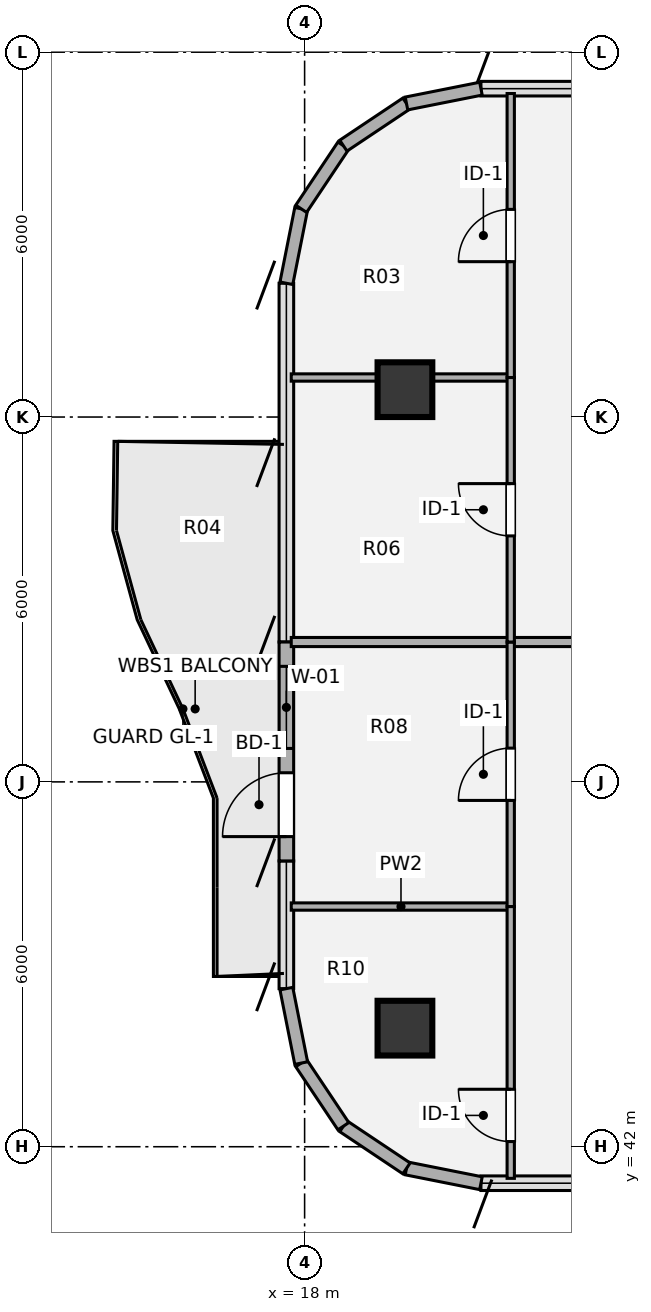
"""IFC4 building model, lengths in metres.
Left out: names, types, materials, properties, quantities, classifications, styles, units other than length and angle.
Written with IfcOpenShell. Run it as: python <this file> out.ifc"""

import sys

from ifc_helpers import new_model, si_unit, direction, frame, frame_2d, origin, origin_2d, place, context, subcontext, project, spatial, rectangle, hollow_circle, extrude, source, transform, mapped, element, fill, save


model = new_model("IFC4")
c1 = context("Model", 3, precision=1e-05, world=origin(), true_north=direction((0.0, 1.0)))
c2 = subcontext(c1, "Body", "Model", "MODEL_VIEW")
j1 = project(units=[si_unit("LENGTHUNIT", "METRE"), si_unit("PLANEANGLEUNIT", "RADIAN")], contexts=[c1])
p1 = place(None, origin())
s1 = spatial("IfcSite", under=j1, at=p1, CompositionType="ELEMENT")
p2 = place(p1, origin())
s2 = spatial("IfcBuilding", under=s1, at=p2, CompositionType="ELEMENT")
p3 = place(p2, frame((0.0, 0.0, 279.72)))
s3 = spatial("IfcBuildingStorey", under=s2, at=p3, CompositionType="ELEMENT", Elevation=279.72)
m1 = source(origin(), c2, "Body", "SweptSolid", [
    extrude(hollow_circle(Radius=0.45, WallThickness=0.032, at=origin_2d()), origin(), (0.0, 0.0, 1.0), 3.78),
])
for number, where, z_axis, x_axis in (
    (1, (19.65, 43.95, 0.0), (0.0, 0.0, 1.0), (1.0, 0.0, 0.0)),
    (2, (19.65, 54.45, 0.0), (0.0, 0.0, 1.0), (1.0, 0.0, 0.0)),
):
    element("IfcColumn", number, at=place(p3, frame(where, z_axis=z_axis, x_axis=x_axis)), inside=s3, PredefinedType="COLUMN", context=c2, shape_type="MappedRepresentation", body=[
        mapped(m1, transform((0.0, 0.0, 0.0), x_axis=(1.0, 0.0, 0.0), y_axis=(0.0, 1.0, 0.0), z_axis=(0.0, 0.0, 1.0), scale=1.0)),
    ])
for number, where, z_axis, x_axis in (
    (3, (20.9, 41.4, 0.0), (0.0, 0.0, 1.0), (-0.981, 0.195, 0.0)),
    (4, (19.675, 41.644, 0.0), (0.0, 0.0, 1.0), (-0.831, 0.556, 0.0)),
    (5, (18.637, 42.337, 0.0), (0.0, 0.0, 1.0), (-0.556, 0.831, 0.0)),
    (6, (17.944, 43.375, 0.0), (0.0, 0.0, 1.0), (-0.195, 0.981, 0.0)),
):
    element("IfcWall", number, at=place(p3, frame(where, z_axis=z_axis, x_axis=x_axis)), inside=s3, PredefinedType="SOLIDWALL", context=c2, shape_type="SweptSolid", body=[
        extrude(rectangle(XDim=1.249, YDim=0.215, at=frame_2d((0.624, 0.0))), origin(), (0.0, 0.0, 1.0), 3.53),
    ])
p4 = place(p3, frame((17.7, 46.7, 0.0), z_axis=(0.0, 0.0, 1.0), x_axis=(0.0, 1.0, 0.0)))
e7 = element("IfcWall", 7, at=p4, inside=s3, PredefinedType="SOLIDWALL", context=c2, shape_type="SweptSolid", body=[
    extrude(rectangle(XDim=3.6, YDim=0.24, at=frame_2d((1.8, 0.0))), origin(), (0.0, 0.0, 1.0), 3.53),
])
p5 = place(p4, frame((0.4, 0.0, 0.0)))
e8 = element("IfcOpeningElement", 8, at=p5, cuts=e7, PredefinedType="OPENING", context=c2, shape_type="SweptSolid", body=[
    extrude(rectangle(XDim=1.05, YDim=2.15, at=origin_2d()), frame((0.525, 0.13, 1.075), z_axis=(0.0, -1.0, 0.0), x_axis=(1.0, 0.0, 0.0)), (0.0, 0.0, 1.0), 0.26),
])
p6 = place(p4, frame((1.85, 0.0, 0.85)))
e9 = element("IfcOpeningElement", 9, at=p6, cuts=e7, PredefinedType="OPENING", context=c2, shape_type="SweptSolid", body=[
    extrude(rectangle(XDim=1.35, YDim=1.35, at=origin_2d()), frame((0.675, 0.13, 0.675), z_axis=(0.0, -1.0, 0.0), x_axis=(1.0, 0.0, 0.0)), (0.0, 0.0, 1.0), 0.26),
])
for number, where, z_axis, x_axis in (
    (10, (17.7, 56.2, 0.0), (0.0, 0.0, 1.0), (0.195, 0.981, 0.0)),
    (11, (17.944, 57.425, 0.0), (0.0, 0.0, 1.0), (0.556, 0.831, 0.0)),
    (12, (18.637, 58.463, 0.0), (0.0, 0.0, 1.0), (0.831, 0.556, 0.0)),
    (13, (19.675, 59.156, 0.0), (0.0, 0.0, 1.0), (0.981, 0.195, 0.0)),
):
    element("IfcWall", number, at=place(p3, frame(where, z_axis=z_axis, x_axis=x_axis)), inside=s3, PredefinedType="SOLIDWALL", context=c2, shape_type="SweptSolid", body=[
        extrude(rectangle(XDim=1.249, YDim=0.215, at=frame_2d((0.624, 0.0))), origin(), (0.0, 0.0, 1.0), 3.53),
    ])
p7 = place(p3, frame((17.78, 45.95, 0.0), z_axis=(0.0, 0.0, 1.0), x_axis=(1.0, 0.0, 0.0)))
e14 = element("IfcWall", 14, at=p7, inside=s3, PredefinedType="PARTITIONING", context=c2, shape_type="SweptSolid", body=[
    extrude(rectangle(XDim=3.61, YDim=0.12, at=frame_2d((1.805, 0.0))), origin(), (0.0, 0.0, 1.0), 2.982),
])
p8 = place(p3, frame((17.78, 50.3, 0.0), z_axis=(0.0, 0.0, 1.0), x_axis=(1.0, 0.0, 0.0)))
e15 = element("IfcWall", 15, at=p8, inside=s3, PredefinedType="PARTITIONING", context=c2, shape_type="SweptSolid", body=[
    extrude(rectangle(XDim=17.32, YDim=0.15, at=frame_2d((8.66, 0.0))), origin(), (0.0, 0.0, 1.0), 2.982),
])
p9 = place(p3, frame((17.78, 54.65, 0.0), z_axis=(0.0, 0.0, 1.0), x_axis=(1.0, 0.0, 0.0)))
e16 = element("IfcWall", 16, at=p9, inside=s3, PredefinedType="PARTITIONING", context=c2, shape_type="SweptSolid", body=[
    extrude(rectangle(XDim=3.61, YDim=0.12, at=frame_2d((1.805, 0.0))), origin(), (0.0, 0.0, 1.0), 2.903),
])
p10 = place(p3, frame((21.39, 41.48, 0.0), z_axis=(0.0, 0.0, 1.0), x_axis=(0.0, 1.0, 0.0)))
e17 = element("IfcWall", 17, at=p10, inside=s3, PredefinedType="PARTITIONING", context=c2, shape_type="SweptSolid", body=[
    extrude(rectangle(XDim=4.47, YDim=0.12, at=frame_2d((2.235, 0.0))), origin(), (0.0, 0.0, 1.0), 3.5),
])
p11 = place(p10, frame((0.605, 0.0, 0.0)))
e18 = element("IfcOpeningElement", 18, at=p11, cuts=e17, PredefinedType="OPENING", context=c2, shape_type="SweptSolid", body=[
    extrude(rectangle(XDim=0.86, YDim=2.1, at=origin_2d()), frame((0.43, 0.07, 1.05), z_axis=(0.0, -1.0, 0.0), x_axis=(1.0, 0.0, 0.0)), (0.0, 0.0, 1.0), 0.14),
])
p12 = place(p3, frame((21.39, 45.95, 0.0), z_axis=(0.0, 0.0, 1.0), x_axis=(0.0, 1.0, 0.0)))
e19 = element("IfcWall", 19, at=p12, inside=s3, PredefinedType="PARTITIONING", context=c2, shape_type="SweptSolid", body=[
    extrude(rectangle(XDim=4.35, YDim=0.12, at=frame_2d((2.175, 0.0))), origin(), (0.0, 0.0, 1.0), 3.5),
])
p13 = place(p12, frame((1.745, 0.0, 0.0)))
e20 = element("IfcOpeningElement", 20, at=p13, cuts=e19, PredefinedType="OPENING", context=c2, shape_type="SweptSolid", body=[
    extrude(rectangle(XDim=0.86, YDim=2.1, at=origin_2d()), frame((0.43, 0.07, 1.05), z_axis=(0.0, -1.0, 0.0), x_axis=(1.0, 0.0, 0.0)), (0.0, 0.0, 1.0), 0.14),
])
p14 = place(p3, frame((21.39, 50.3, 0.0), z_axis=(0.0, 0.0, 1.0), x_axis=(0.0, 1.0, 0.0)))
e21 = element("IfcWall", 21, at=p14, inside=s3, PredefinedType="PARTITIONING", context=c2, shape_type="SweptSolid", body=[
    extrude(rectangle(XDim=4.35, YDim=0.12, at=frame_2d((2.175, 0.0))), origin(), (0.0, 0.0, 1.0), 3.5),
])
p15 = place(p14, frame((1.745, 0.0, 0.0)))
e22 = element("IfcOpeningElement", 22, at=p15, cuts=e21, PredefinedType="OPENING", context=c2, shape_type="SweptSolid", body=[
    extrude(rectangle(XDim=0.86, YDim=2.1, at=origin_2d()), frame((0.43, 0.07, 1.05), z_axis=(0.0, -1.0, 0.0), x_axis=(1.0, 0.0, 0.0)), (0.0, 0.0, 1.0), 0.14),
])
p16 = place(p3, frame((21.39, 54.65, 0.0), z_axis=(0.0, 0.0, 1.0), x_axis=(0.0, 1.0, 0.0)))
e23 = element("IfcWall", 23, at=p16, inside=s3, PredefinedType="PARTITIONING", context=c2, shape_type="SweptSolid", body=[
    extrude(rectangle(XDim=4.67, YDim=0.12, at=frame_2d((2.335, 0.0))), origin(), (0.0, 0.0, 1.0), 3.5),
])
p17 = place(p16, frame((1.905, 0.0, 0.0)))
e24 = element("IfcOpeningElement", 24, at=p17, cuts=e23, PredefinedType="OPENING", context=c2, shape_type="SweptSolid", body=[
    extrude(rectangle(XDim=0.86, YDim=2.1, at=origin_2d()), frame((0.43, 0.07, 1.05), z_axis=(0.0, -1.0, 0.0), x_axis=(1.0, 0.0, 0.0)), (0.0, 0.0, 1.0), 0.14),
])
m2 = source(origin(), c2, "Body", "SweptSolid", [
    extrude(rectangle(XDim=1.05, YDim=2.15, at=origin_2d()), frame((0.525, 0.025, 1.075), z_axis=(0.0, -1.0, 0.0), x_axis=(1.0, 0.0, 0.0)), (0.0, 0.0, 1.0), 0.05),
])
p18 = place(p5, origin())
e25 = element("IfcDoor", 25, at=p18, inside=s3, OperationType="SINGLE_SWING_LEFT", PredefinedType="DOOR", context=c2, shape_type="MappedRepresentation", body=[
    mapped(m2, transform((0.0, 0.0, 0.0), x_axis=(1.0, 0.0, 0.0), y_axis=(0.0, 1.0, 0.0), z_axis=(0.0, 0.0, 1.0), scale=1.0)),
])
fill(e8, e25)
m3 = source(origin(), c2, "Body", "SweptSolid", [
    extrude(rectangle(XDim=1.35, YDim=1.35, at=origin_2d()), frame((0.675, 0.03, 0.675), z_axis=(0.0, -1.0, 0.0), x_axis=(1.0, 0.0, 0.0)), (0.0, 0.0, 1.0), 0.06),
])
p19 = place(p6, origin())
e26 = element("IfcWindow", 26, at=p19, inside=s3, PartitioningType="SINGLE_PANEL", PredefinedType="WINDOW", context=c2, shape_type="MappedRepresentation", body=[
    mapped(m3, transform((0.0, 0.0, 0.0), x_axis=(1.0, 0.0, 0.0), y_axis=(0.0, 1.0, 0.0), z_axis=(0.0, 0.0, 1.0), scale=1.0)),
])
fill(e9, e26)
m4 = source(origin(), c2, "Body", "SweptSolid", [
    extrude(rectangle(XDim=0.86, YDim=2.1, at=origin_2d()), frame((0.43, 0.025, 1.05), z_axis=(0.0, -1.0, 0.0), x_axis=(1.0, 0.0, 0.0)), (0.0, 0.0, 1.0), 0.05),
])
p20 = place(p11, origin())
e27 = element("IfcDoor", 27, at=p20, inside=s3, OperationType="SINGLE_SWING_RIGHT", PredefinedType="DOOR", context=c2, shape_type="MappedRepresentation", body=[
    mapped(m4, transform((0.0, 0.0, 0.0), x_axis=(1.0, 0.0, 0.0), y_axis=(0.0, 1.0, 0.0), z_axis=(0.0, 0.0, 1.0), scale=1.0)),
])
fill(e18, e27)
p21 = place(p13, origin())
e28 = element("IfcDoor", 28, at=p21, inside=s3, OperationType="SINGLE_SWING_LEFT", PredefinedType="DOOR", context=c2, shape_type="MappedRepresentation", body=[
    mapped(m4, transform((0.0, 0.0, 0.0), x_axis=(1.0, 0.0, 0.0), y_axis=(0.0, 1.0, 0.0), z_axis=(0.0, 0.0, 1.0), scale=1.0)),
])
fill(e20, e28)
p22 = place(p15, origin())
e29 = element("IfcDoor", 29, at=p22, inside=s3, OperationType="SINGLE_SWING_RIGHT", PredefinedType="DOOR", context=c2, shape_type="MappedRepresentation", body=[
    mapped(m4, transform((0.0, 0.0, 0.0), x_axis=(1.0, 0.0, 0.0), y_axis=(0.0, 1.0, 0.0), z_axis=(0.0, 0.0, 1.0), scale=1.0)),
])
fill(e22, e29)
p23 = place(p17, origin())
e30 = element("IfcDoor", 30, at=p23, inside=s3, OperationType="SINGLE_SWING_LEFT", PredefinedType="DOOR", context=c2, shape_type="MappedRepresentation", body=[
    mapped(m4, transform((0.0, 0.0, 0.0), x_axis=(1.0, 0.0, 0.0), y_axis=(0.0, 1.0, 0.0), z_axis=(0.0, 0.0, 1.0), scale=1.0)),
])
fill(e24, e30)
save(model, sys.argv[1])
